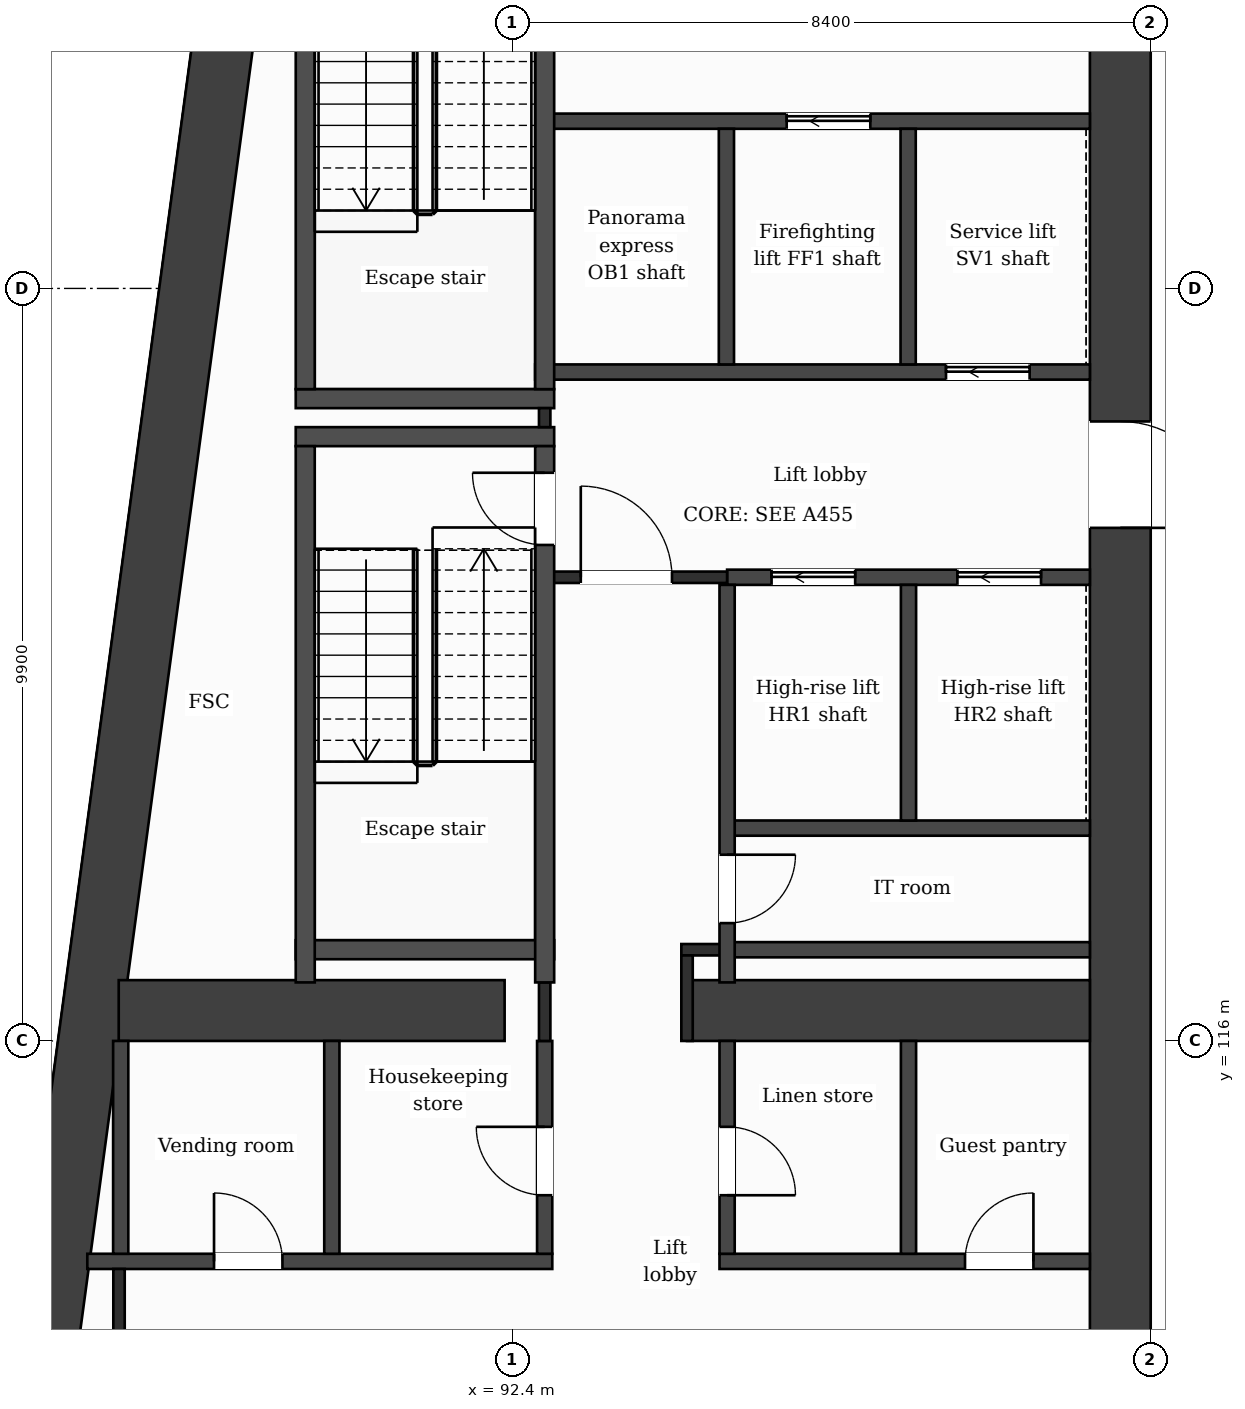
"""IFC4 building model, lengths in metres.
Left out: names, types, materials, properties, quantities, classifications, styles, units other than length and angle.
Written with IfcOpenShell. Run it as: python <this file> out.ifc"""

import sys

from ifc_helpers import new_model, si_unit, direction, frame, frame_2d, origin, place, context, subcontext, project, spatial, rectangle, extrude, element, fill, save


model = new_model("IFC4")
c1 = context("Model", 3, precision=1e-05, world=origin(), true_north=direction((0.0, 1.0)))
c2 = subcontext(c1, "Body", "Model", "MODEL_VIEW")
j1 = project(units=[si_unit("LENGTHUNIT", "METRE"), si_unit("PLANEANGLEUNIT", "RADIAN")], contexts=[c1])
p1 = place(None, origin())
s1 = spatial("IfcSite", under=j1, at=p1, CompositionType="ELEMENT")
p2 = place(p1, origin())
s2 = spatial("IfcBuilding", under=s1, at=p2, CompositionType="ELEMENT")
p3 = place(p2, frame((0.0, 0.0, 224.4)))
s3 = spatial("IfcBuildingStorey", under=s2, at=p3, CompositionType="ELEMENT", Elevation=224.4)
p4 = place(p3, frame((100.4, 132.0, 0.0), z_axis=(0.0, 0.0, 1.0), x_axis=(0.0, -1.0, 0.0)))
e1 = element("IfcWall", 1, at=p4, inside=s3, PredefinedType="SHEAR", context=c2, shape_type="SweptSolid", body=[
    extrude(rectangle(XDim=21.2, YDim=0.8, at=frame_2d((10.6, 0.0))), origin(), (0.0, 0.0, 1.0), 3.7),
])
p5 = place(p4, frame((7.85, 0.0, 0.0)))
e2 = element("IfcOpeningElement", 2, at=p5, cuts=e1, PredefinedType="OPENING", context=c2, shape_type="SweptSolid", body=[
    extrude(rectangle(XDim=1.4, YDim=2.1, at=frame_2d((0.7, 1.05))), frame((0.0, 0.41, 0.0), z_axis=(0.0, -1.0, 0.0), x_axis=(1.0, 0.0, 0.0)), (0.0, 0.0, 1.0), 0.82),
])
p6 = place(p3, frame((86.127, 110.8, 0.0), z_axis=(0.0, 0.0, 1.0), x_axis=(0.133408347329, 0.991061154956, 0.0)))
e3 = element("IfcWall", 3, at=p6, inside=s3, PredefinedType="SHEAR", context=c2, shape_type="SweptSolid", body=[
    extrude(rectangle(XDim=21.391, YDim=0.8, at=frame_2d((10.696, 0.0))), origin(), (0.0, 0.0, 1.0), 3.7),
])
p7 = place(p3, frame((87.223, 116.4, 0.0), z_axis=(0.0, 0.0, 1.0), x_axis=(1.0, 0.0, 0.0)))
e4 = element("IfcWall", 4, at=p7, inside=s3, PredefinedType="SHEAR", context=c2, shape_type="SweptSolid", body=[
    extrude(rectangle(XDim=5.077, YDim=0.8, at=frame_2d((2.539, 0.0))), origin(), (0.0, 0.0, 1.0), 3.7),
])
p8 = place(p3, frame((94.7, 116.4, 0.0), z_axis=(0.0, 0.0, 1.0), x_axis=(1.0, 0.0, 0.0)))
e5 = element("IfcWall", 5, at=p8, inside=s3, PredefinedType="SHEAR", context=c2, shape_type="SweptSolid", body=[
    extrude(rectangle(XDim=5.3, YDim=0.8, at=frame_2d((2.65, 0.0))), origin(), (0.0, 0.0, 1.0), 3.7),
])
p9 = place(p3, frame((86.81, 113.1, 0.0), z_axis=(0.0, 0.0, 1.0), x_axis=(1.0, 0.0, 0.0)))
e6 = element("IfcWall", 6, at=p9, inside=s3, PredefinedType="PARTITIONING", context=c2, shape_type="SweptSolid", body=[
    extrude(rectangle(XDim=6.117, YDim=0.2, at=frame_2d((3.059, 0.0))), origin(), (0.0, 0.0, 1.0), 3.38),
])
p10 = place(p9, frame((1.667, 0.0, 0.0)))
e7 = element("IfcOpeningElement", 7, at=p10, cuts=e6, PredefinedType="OPENING", context=c2, shape_type="SweptSolid", body=[
    extrude(rectangle(XDim=0.9, YDim=2.1, at=frame_2d((0.45, 1.05))), frame((0.0, 0.11, 0.0), z_axis=(0.0, -1.0, 0.0), x_axis=(1.0, 0.0, 0.0)), (0.0, 0.0, 1.0), 0.22),
])
p11 = place(p3, frame((95.127, 113.1, 0.0), z_axis=(0.0, 0.0, 1.0), x_axis=(1.0, 0.0, 0.0)))
e8 = element("IfcWall", 8, at=p11, inside=s3, PredefinedType="PARTITIONING", context=c2, shape_type="SweptSolid", body=[
    extrude(rectangle(XDim=4.873, YDim=0.2, at=frame_2d((2.437, 0.0))), origin(), (0.0, 0.0, 1.0), 3.38),
])
p12 = place(p11, frame((3.23, 0.0, 0.0)))
e9 = element("IfcOpeningElement", 9, at=p12, cuts=e8, PredefinedType="OPENING", context=c2, shape_type="SweptSolid", body=[
    extrude(rectangle(XDim=0.9, YDim=2.1, at=frame_2d((0.45, 1.05))), frame((0.0, 0.11, 0.0), z_axis=(0.0, -1.0, 0.0), x_axis=(1.0, 0.0, 0.0)), (0.0, 0.0, 1.0), 0.22),
])
p13 = place(p3, frame((95.227, 117.2, 0.0), z_axis=(0.0, 0.0, 1.0), x_axis=(1.0, 0.0, 0.0)))
e10 = element("IfcWall", 10, at=p13, inside=s3, PredefinedType="PARTITIONING", context=c2, shape_type="SweptSolid", body=[
    extrude(rectangle(XDim=4.773, YDim=0.2, at=frame_2d((2.386, 0.0))), origin(), (0.0, 0.0, 1.0), 3.38),
])
p14 = place(p3, frame((94.625, 117.2, 0.0), z_axis=(0.0, 0.0, 1.0), x_axis=(1.0, 0.0, 0.0)))
e11 = element("IfcWall", 11, at=p14, inside=s3, PredefinedType="PARTITIONING", context=c2, shape_type="SweptSolid", body=[
    extrude(rectangle(XDim=0.602, YDim=0.15, at=frame_2d((0.301, 0.0))), origin(), (0.0, 0.0, 1.0), 3.38),
])
p15 = place(p3, frame((89.552, 117.2, 0.0), z_axis=(0.0, 0.0, 1.0), x_axis=(1.0, 0.0, 0.0)))
e12 = element("IfcWall", 12, at=p15, inside=s3, PredefinedType="PARTITIONING", context=c2, shape_type="SweptSolid", body=[
    extrude(rectangle(XDim=3.4, YDim=0.25, at=frame_2d((1.7, 0.0))), origin(), (0.0, 0.0, 1.0), 3.38),
])
p16 = place(p3, frame((95.227, 118.8, 0.0), z_axis=(0.0, 0.0, 1.0), x_axis=(1.0, 0.0, 0.0)))
e13 = element("IfcWall", 13, at=p16, inside=s3, PredefinedType="PARTITIONING", context=c2, shape_type="SweptSolid", body=[
    extrude(rectangle(XDim=4.773, YDim=0.2, at=frame_2d((2.386, 0.0))), origin(), (0.0, 0.0, 1.0), 3.38),
])
p17 = place(p3, frame((95.227, 122.1, 0.0), z_axis=(0.0, 0.0, 1.0), x_axis=(1.0, 0.0, 0.0)))
e14 = element("IfcWall", 14, at=p17, inside=s3, PredefinedType="PARTITIONING", context=c2, shape_type="SweptSolid", body=[
    extrude(rectangle(XDim=4.773, YDim=0.2, at=frame_2d((2.386, 0.0))), origin(), (0.0, 0.0, 1.0), 3.38),
])
p18 = place(p17, frame((0.585, 0.0, 0.0)))
e15 = element("IfcOpeningElement", 15, at=p18, cuts=e14, PredefinedType="OPENING", context=c2, shape_type="SweptSolid", body=[
    extrude(rectangle(XDim=1.1, YDim=2.1, at=frame_2d((0.55, 1.05))), frame((0.0, 0.11, 0.0), z_axis=(0.0, -1.0, 0.0), x_axis=(1.0, 0.0, 0.0)), (0.0, 0.0, 1.0), 0.22),
])
p19 = place(p17, frame((3.03, 0.0, 0.0)))
e16 = element("IfcOpeningElement", 16, at=p19, cuts=e14, PredefinedType="OPENING", context=c2, shape_type="SweptSolid", body=[
    extrude(rectangle(XDim=1.1, YDim=2.1, at=frame_2d((0.55, 1.05))), frame((0.0, 0.11, 0.0), z_axis=(0.0, -1.0, 0.0), x_axis=(1.0, 0.0, 0.0)), (0.0, 0.0, 1.0), 0.22),
])
p20 = place(p3, frame((92.827, 122.1, 0.0), z_axis=(0.0, 0.0, 1.0), x_axis=(1.0, 0.0, 0.0)))
e17 = element("IfcWall", 17, at=p20, inside=s3, PredefinedType="PARTITIONING", context=c2, shape_type="SweptSolid", body=[
    extrude(rectangle(XDim=2.4, YDim=0.15, at=frame_2d((1.2, 0.0))), origin(), (0.0, 0.0, 1.0), 3.38),
])
p21 = place(p20, frame((0.475, 0.0, 0.0)))
e18 = element("IfcOpeningElement", 18, at=p21, cuts=e17, PredefinedType="OPENING", context=c2, shape_type="SweptSolid", body=[
    extrude(rectangle(XDim=1.2, YDim=2.1, at=frame_2d((0.6, 1.05))), frame((0.0, 0.085, 0.0), z_axis=(0.0, -1.0, 0.0), x_axis=(1.0, 0.0, 0.0)), (0.0, 0.0, 1.0), 0.17),
])
for number, where, z_axis, x_axis in (
    (19, (89.552, 123.95, 0.0), (0.0, 0.0, 1.0), (1.0, 0.0, 0.0)),
    (20, (89.552, 124.45, 0.0), (0.0, 0.0, 1.0), (1.0, 0.0, 0.0)),
):
    element("IfcWall", number, at=place(p3, frame(where, z_axis=z_axis, x_axis=x_axis)), inside=s3, PredefinedType="PARTITIONING", context=c2, shape_type="SweptSolid", body=[
        extrude(rectangle(XDim=3.4, YDim=0.25, at=frame_2d((1.7, 0.0))), origin(), (0.0, 0.0, 1.0), 3.38),
    ])
p22 = place(p3, frame((92.702, 124.8, 0.0), z_axis=(0.0, 0.0, 1.0), x_axis=(1.0, 0.0, 0.0)))
e21 = element("IfcWall", 21, at=p22, inside=s3, PredefinedType="PARTITIONING", context=c2, shape_type="SweptSolid", body=[
    extrude(rectangle(XDim=7.298, YDim=0.2, at=frame_2d((3.649, 0.0))), origin(), (0.0, 0.0, 1.0), 3.38),
])
p23 = place(p22, frame((5.405, 0.0, 0.0)))
e22 = element("IfcOpeningElement", 22, at=p23, cuts=e21, PredefinedType="OPENING", context=c2, shape_type="SweptSolid", body=[
    extrude(rectangle(XDim=1.1, YDim=2.1, at=frame_2d((0.55, 1.05))), frame((0.0, 0.11, 0.0), z_axis=(0.0, -1.0, 0.0), x_axis=(1.0, 0.0, 0.0)), (0.0, 0.0, 1.0), 0.22),
])
p24 = place(p3, frame((92.827, 128.1, 0.0), z_axis=(0.0, 0.0, 1.0), x_axis=(1.0, 0.0, 0.0)))
e23 = element("IfcWall", 23, at=p24, inside=s3, PredefinedType="PARTITIONING", context=c2, shape_type="SweptSolid", body=[
    extrude(rectangle(XDim=7.173, YDim=0.2, at=frame_2d((3.586, 0.0))), origin(), (0.0, 0.0, 1.0), 3.38),
])
p25 = place(p24, frame((3.184, 0.0, 0.0)))
e24 = element("IfcOpeningElement", 24, at=p25, cuts=e23, PredefinedType="OPENING", context=c2, shape_type="SweptSolid", body=[
    extrude(rectangle(XDim=1.1, YDim=2.1, at=frame_2d((0.55, 1.05))), frame((0.0, 0.11, 0.0), z_axis=(0.0, -1.0, 0.0), x_axis=(1.0, 0.0, 0.0)), (0.0, 0.0, 1.0), 0.22),
])
p26 = place(p3, frame((87.25, 113.2, 0.0), z_axis=(0.0, 0.0, 1.0), x_axis=(0.0, 1.0, 0.0)))
e25 = element("IfcWall", 25, at=p26, inside=s3, PredefinedType="PARTITIONING", context=c2, shape_type="SweptSolid", body=[
    extrude(rectangle(XDim=2.8, YDim=0.2, at=frame_2d((1.4, 0.0))), origin(), (0.0, 0.0, 1.0), 3.38),
])
p27 = place(p3, frame((87.227, 111.2, 0.0), z_axis=(0.0, 0.0, 1.0), x_axis=(0.0, 1.0, 0.0)))
e26 = element("IfcWall", 26, at=p27, inside=s3, PredefinedType="PARTITIONING", context=c2, shape_type="SweptSolid", body=[
    extrude(rectangle(XDim=1.8, YDim=0.15, at=frame_2d((0.9, 0.0))), origin(), (0.0, 0.0, 1.0), 3.38),
])
for number, where, z_axis, x_axis in (
    (27, (89.677, 116.77, 0.0), (0.0, 0.0, 1.0), (0.0, 1.0, 0.0)),
    (28, (89.677, 124.575, 0.0), (0.0, 0.0, 1.0), (0.0, 1.0, 0.0)),
):
    element("IfcWall", number, at=place(p3, frame(where, z_axis=z_axis, x_axis=x_axis)), inside=s3, PredefinedType="PARTITIONING", context=c2, shape_type="SweptSolid", body=[
        extrude(rectangle(XDim=7.055, YDim=0.25, at=frame_2d((3.527, 0.0))), origin(), (0.0, 0.0, 1.0), 3.38),
    ])
p28 = place(p3, frame((90.027, 113.2, 0.0), z_axis=(0.0, 0.0, 1.0), x_axis=(0.0, 1.0, 0.0)))
e29 = element("IfcWall", 29, at=p28, inside=s3, PredefinedType="PARTITIONING", context=c2, shape_type="SweptSolid", body=[
    extrude(rectangle(XDim=2.8, YDim=0.2, at=frame_2d((1.4, 0.0))), origin(), (0.0, 0.0, 1.0), 3.38),
])
p29 = place(p3, frame((92.827, 113.2, 0.0), z_axis=(0.0, 0.0, 1.0), x_axis=(0.0, 1.0, 0.0)))
e30 = element("IfcWall", 30, at=p29, inside=s3, PredefinedType="PARTITIONING", context=c2, shape_type="SweptSolid", body=[
    extrude(rectangle(XDim=2.8, YDim=0.2, at=frame_2d((1.4, 0.0))), origin(), (0.0, 0.0, 1.0), 3.38),
])
p30 = place(p29, frame((0.77, 0.0, 0.0)))
e31 = element("IfcOpeningElement", 31, at=p30, cuts=e30, PredefinedType="OPENING", context=c2, shape_type="SweptSolid", body=[
    extrude(rectangle(XDim=0.9, YDim=2.1, at=frame_2d((0.45, 1.05))), frame((0.0, 0.11, 0.0), z_axis=(0.0, -1.0, 0.0), x_axis=(1.0, 0.0, 0.0)), (0.0, 0.0, 1.0), 0.22),
])
p31 = place(p3, frame((92.827, 116.0, 0.0), z_axis=(0.0, 0.0, 1.0), x_axis=(0.0, 1.0, 0.0)))
e32 = element("IfcWall", 32, at=p31, inside=s3, PredefinedType="PARTITIONING", context=c2, shape_type="SweptSolid", body=[
    extrude(rectangle(XDim=0.77, YDim=0.15, at=frame_2d((0.385, 0.0))), origin(), (0.0, 0.0, 1.0), 3.38),
])
p32 = place(p3, frame((92.827, 124.075, 0.0), z_axis=(0.0, 0.0, 1.0), x_axis=(0.0, 1.0, 0.0)))
e33 = element("IfcWall", 33, at=p32, inside=s3, PredefinedType="PARTITIONING", context=c2, shape_type="SweptSolid", body=[
    extrude(rectangle(XDim=0.25, YDim=0.15, at=frame_2d((0.125, 0.0))), origin(), (0.0, 0.0, 1.0), 3.38),
])
p33 = place(p3, frame((92.827, 116.77, 0.0), z_axis=(0.0, 0.0, 1.0), x_axis=(0.0, 1.0, 0.0)))
e34 = element("IfcWall", 34, at=p33, inside=s3, PredefinedType="PARTITIONING", context=c2, shape_type="SweptSolid", body=[
    extrude(rectangle(XDim=7.055, YDim=0.25, at=frame_2d((3.527, 0.0))), origin(), (0.0, 0.0, 1.0), 3.38),
])
p34 = place(p33, frame((5.755, 0.0, 0.0)))
e35 = element("IfcOpeningElement", 35, at=p34, cuts=e34, PredefinedType="OPENING", context=c2, shape_type="SweptSolid", body=[
    extrude(rectangle(XDim=0.95, YDim=2.1, at=frame_2d((0.475, 1.05))), frame((0.0, 0.135, 0.0), z_axis=(0.0, -1.0, 0.0), x_axis=(1.0, 0.0, 0.0)), (0.0, 0.0, 1.0), 0.27),
])
p35 = place(p3, frame((92.827, 124.575, 0.0), z_axis=(0.0, 0.0, 1.0), x_axis=(0.0, 1.0, 0.0)))
e36 = element("IfcWall", 36, at=p35, inside=s3, PredefinedType="PARTITIONING", context=c2, shape_type="SweptSolid", body=[
    extrude(rectangle(XDim=7.055, YDim=0.25, at=frame_2d((3.527, 0.0))), origin(), (0.0, 0.0, 1.0), 3.38),
])
p36 = place(p35, frame((5.325, 0.0, 0.0)))
e37 = element("IfcOpeningElement", 37, at=p36, cuts=e36, PredefinedType="OPENING", context=c2, shape_type="SweptSolid", body=[
    extrude(rectangle(XDim=1.0, YDim=2.1, at=frame_2d((0.5, 1.05))), frame((0.0, 0.135, 0.0), z_axis=(0.0, -1.0, 0.0), x_axis=(1.0, 0.0, 0.0)), (0.0, 0.0, 1.0), 0.27),
])
p37 = place(p3, frame((94.7, 116.0, 0.0), z_axis=(0.0, 0.0, 1.0), x_axis=(0.0, 1.0, 0.0)))
e38 = element("IfcWall", 38, at=p37, inside=s3, PredefinedType="PARTITIONING", context=c2, shape_type="SweptSolid", body=[
    extrude(rectangle(XDim=1.125, YDim=0.15, at=frame_2d((0.562, 0.0))), origin(), (0.0, 0.0, 1.0), 3.38),
])
p38 = place(p3, frame((95.218, 124.9, 0.0), z_axis=(0.0, 0.0, 1.0), x_axis=(0.0, 1.0, 0.0)))
e39 = element("IfcWall", 39, at=p38, inside=s3, PredefinedType="PARTITIONING", context=c2, shape_type="SweptSolid", body=[
    extrude(rectangle(XDim=3.1, YDim=0.2, at=frame_2d((1.55, 0.0))), origin(), (0.0, 0.0, 1.0), 3.38),
])
p39 = place(p3, frame((95.227, 113.2, 0.0), z_axis=(0.0, 0.0, 1.0), x_axis=(0.0, 1.0, 0.0)))
e40 = element("IfcWall", 40, at=p39, inside=s3, PredefinedType="PARTITIONING", context=c2, shape_type="SweptSolid", body=[
    extrude(rectangle(XDim=2.8, YDim=0.2, at=frame_2d((1.4, 0.0))), origin(), (0.0, 0.0, 1.0), 3.38),
])
p40 = place(p39, frame((0.77, 0.0, 0.0)))
e41 = element("IfcOpeningElement", 41, at=p40, cuts=e40, PredefinedType="OPENING", context=c2, shape_type="SweptSolid", body=[
    extrude(rectangle(XDim=0.9, YDim=2.1, at=frame_2d((0.45, 1.05))), frame((0.0, 0.11, 0.0), z_axis=(0.0, -1.0, 0.0), x_axis=(1.0, 0.0, 0.0)), (0.0, 0.0, 1.0), 0.22),
])
p41 = place(p3, frame((95.227, 116.77, 0.0), z_axis=(0.0, 0.0, 1.0), x_axis=(0.0, 1.0, 0.0)))
e42 = element("IfcWall", 42, at=p41, inside=s3, PredefinedType="PARTITIONING", context=c2, shape_type="SweptSolid", body=[
    extrude(rectangle(XDim=5.23, YDim=0.2, at=frame_2d((2.615, 0.0))), origin(), (0.0, 0.0, 1.0), 3.38),
])
p42 = place(p41, frame((0.78, 0.0, 0.0)))
e43 = element("IfcOpeningElement", 43, at=p42, cuts=e42, PredefinedType="OPENING", context=c2, shape_type="SweptSolid", body=[
    extrude(rectangle(XDim=0.9, YDim=2.1, at=frame_2d((0.45, 1.05))), frame((0.0, 0.11, 0.0), z_axis=(0.0, -1.0, 0.0), x_axis=(1.0, 0.0, 0.0)), (0.0, 0.0, 1.0), 0.22),
])
p43 = place(p3, frame((97.609, 124.9, 0.0), z_axis=(0.0, 0.0, 1.0), x_axis=(0.0, 1.0, 0.0)))
e44 = element("IfcWall", 44, at=p43, inside=s3, PredefinedType="PARTITIONING", context=c2, shape_type="SweptSolid", body=[
    extrude(rectangle(XDim=3.1, YDim=0.2, at=frame_2d((1.55, 0.0))), origin(), (0.0, 0.0, 1.0), 3.38),
])
p44 = place(p3, frame((97.614, 113.2, 0.0), z_axis=(0.0, 0.0, 1.0), x_axis=(0.0, 1.0, 0.0)))
e45 = element("IfcWall", 45, at=p44, inside=s3, PredefinedType="PARTITIONING", context=c2, shape_type="SweptSolid", body=[
    extrude(rectangle(XDim=2.8, YDim=0.2, at=frame_2d((1.4, 0.0))), origin(), (0.0, 0.0, 1.0), 3.38),
])
p45 = place(p3, frame((97.614, 118.9, 0.0), z_axis=(0.0, 0.0, 1.0), x_axis=(0.0, 1.0, 0.0)))
e46 = element("IfcWall", 46, at=p45, inside=s3, PredefinedType="PARTITIONING", context=c2, shape_type="SweptSolid", body=[
    extrude(rectangle(XDim=3.1, YDim=0.2, at=frame_2d((1.55, 0.0))), origin(), (0.0, 0.0, 1.0), 3.38),
])
p46 = place(p21, origin())
e47 = element("IfcDoor", 47, at=p46, inside=s3, OperationType="SINGLE_SWING_LEFT", PredefinedType="DOOR", context=c2, shape_type="SweptSolid", body=[
    extrude(rectangle(XDim=1.2, YDim=2.1, at=frame_2d((0.6, 1.05))), frame((0.0, 0.025, 0.0), z_axis=(0.0, -1.0, 0.0), x_axis=(1.0, 0.0, 0.0)), (0.0, 0.0, 1.0), 0.05),
])
fill(e18, e47)
p47 = place(p18, origin())
e48 = element("IfcDoor", 48, at=p47, inside=s3, OperationType="SLIDING_TO_LEFT", PredefinedType="DOOR", context=c2, shape_type="SweptSolid", body=[
    extrude(rectangle(XDim=1.1, YDim=2.1, at=frame_2d((0.55, 1.05))), frame((0.0, 0.025, 0.0), z_axis=(0.0, -1.0, 0.0), x_axis=(1.0, 0.0, 0.0)), (0.0, 0.0, 1.0), 0.05),
])
fill(e15, e48)
p48 = place(p19, origin())
e49 = element("IfcDoor", 49, at=p48, inside=s3, OperationType="SLIDING_TO_LEFT", PredefinedType="DOOR", context=c2, shape_type="SweptSolid", body=[
    extrude(rectangle(XDim=1.1, YDim=2.1, at=frame_2d((0.55, 1.05))), frame((0.0, 0.025, 0.0), z_axis=(0.0, -1.0, 0.0), x_axis=(1.0, 0.0, 0.0)), (0.0, 0.0, 1.0), 0.05),
])
fill(e16, e49)
p49 = place(p25, origin())
e50 = element("IfcDoor", 50, at=p49, inside=s3, OperationType="SLIDING_TO_LEFT", PredefinedType="DOOR", context=c2, shape_type="SweptSolid", body=[
    extrude(rectangle(XDim=1.1, YDim=2.1, at=frame_2d((0.55, 1.05))), frame((0.0, 0.025, 0.0), z_axis=(0.0, -1.0, 0.0), x_axis=(1.0, 0.0, 0.0)), (0.0, 0.0, 1.0), 0.05),
])
fill(e24, e50)
p50 = place(p23, origin())
e51 = element("IfcDoor", 51, at=p50, inside=s3, OperationType="SLIDING_TO_LEFT", PredefinedType="DOOR", context=c2, shape_type="SweptSolid", body=[
    extrude(rectangle(XDim=1.1, YDim=2.1, at=frame_2d((0.55, 1.05))), frame((0.0, 0.025, 0.0), z_axis=(0.0, -1.0, 0.0), x_axis=(1.0, 0.0, 0.0)), (0.0, 0.0, 1.0), 0.05),
])
fill(e22, e51)
p51 = place(p34, origin())
e52 = element("IfcDoor", 52, at=p51, inside=s3, OperationType="SINGLE_SWING_RIGHT", PredefinedType="DOOR", context=c2, shape_type="SweptSolid", body=[
    extrude(rectangle(XDim=0.95, YDim=2.1, at=frame_2d((0.475, 1.05))), frame((0.0, 0.025, 0.0), z_axis=(0.0, -1.0, 0.0), x_axis=(1.0, 0.0, 0.0)), (0.0, 0.0, 1.0), 0.05),
])
fill(e35, e52)
p52 = place(p42, origin())
e53 = element("IfcDoor", 53, at=p52, inside=s3, OperationType="SINGLE_SWING_RIGHT", PredefinedType="DOOR", context=c2, shape_type="SweptSolid", body=[
    extrude(rectangle(XDim=0.9, YDim=2.1, at=frame_2d((0.45, 1.05))), frame((0.0, 0.025, 0.0), z_axis=(0.0, -1.0, 0.0), x_axis=(1.0, 0.0, 0.0)), (0.0, 0.0, 1.0), 0.05),
])
fill(e43, e53)
p53 = place(p10, origin())
e54 = element("IfcDoor", 54, at=p53, inside=s3, OperationType="SINGLE_SWING_LEFT", PredefinedType="DOOR", context=c2, shape_type="SweptSolid", body=[
    extrude(rectangle(XDim=0.9, YDim=2.1, at=frame_2d((0.45, 1.05))), frame((0.0, 0.025, 0.0), z_axis=(0.0, -1.0, 0.0), x_axis=(1.0, 0.0, 0.0)), (0.0, 0.0, 1.0), 0.05),
])
fill(e7, e54)
p54 = place(p30, origin())
e55 = element("IfcDoor", 55, at=p54, inside=s3, OperationType="SINGLE_SWING_RIGHT", PredefinedType="DOOR", context=c2, shape_type="SweptSolid", body=[
    extrude(rectangle(XDim=0.9, YDim=2.1, at=frame_2d((0.45, 1.05))), frame((0.0, 0.025, 0.0), z_axis=(0.0, -1.0, 0.0), x_axis=(1.0, 0.0, 0.0)), (0.0, 0.0, 1.0), 0.05),
])
fill(e31, e55)
p55 = place(p40, origin())
e56 = element("IfcDoor", 56, at=p55, inside=s3, OperationType="SINGLE_SWING_LEFT", PredefinedType="DOOR", context=c2, shape_type="SweptSolid", body=[
    extrude(rectangle(XDim=0.9, YDim=2.1, at=frame_2d((0.45, 1.05))), frame((0.0, 0.025, 0.0), z_axis=(0.0, -1.0, 0.0), x_axis=(1.0, 0.0, 0.0)), (0.0, 0.0, 1.0), 0.05),
])
fill(e41, e56)
p56 = place(p12, origin())
e57 = element("IfcDoor", 57, at=p56, inside=s3, OperationType="SINGLE_SWING_RIGHT", PredefinedType="DOOR", context=c2, shape_type="SweptSolid", body=[
    extrude(rectangle(XDim=0.9, YDim=2.1, at=frame_2d((0.45, 1.05))), frame((0.0, 0.025, 0.0), z_axis=(0.0, -1.0, 0.0), x_axis=(1.0, 0.0, 0.0)), (0.0, 0.0, 1.0), 0.05),
])
fill(e9, e57)
p57 = place(p5, origin())
e58 = element("IfcDoor", 58, at=p57, inside=s3, OperationType="SINGLE_SWING_RIGHT", PredefinedType="DOOR", context=c2, shape_type="SweptSolid", body=[
    extrude(rectangle(XDim=1.4, YDim=2.1, at=frame_2d((0.7, 1.05))), frame((0.0, 0.025, 0.0), z_axis=(0.0, -1.0, 0.0), x_axis=(1.0, 0.0, 0.0)), (0.0, 0.0, 1.0), 0.05),
])
fill(e2, e58)
save(model, sys.argv[1])
